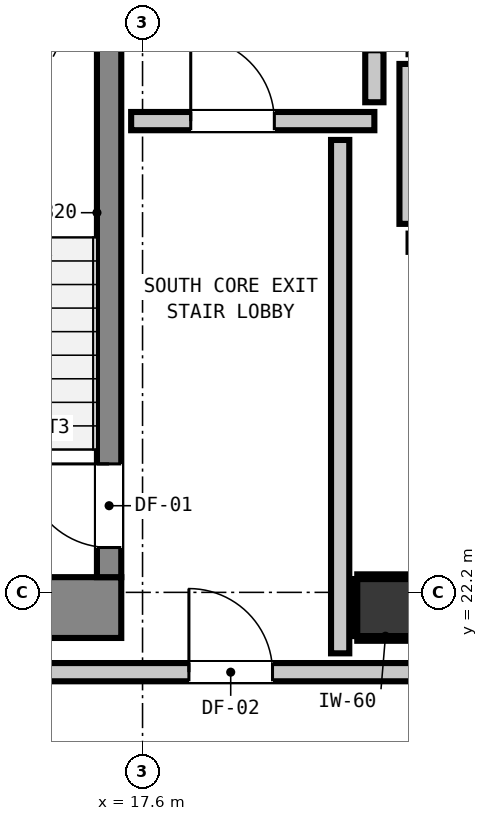
"""IFC4 building model, lengths in metres.
Left out: names, types, materials, properties, quantities, classifications, styles, units other than length and angle.
Written with IfcOpenShell. Run it as: python <this file> out.ifc"""

import sys

from ifc_helpers import new_model, si_unit, direction, frame, frame_2d, origin, origin_2d, place, context, subcontext, project, spatial, rectangle, extrude, element, fill, save


model = new_model("IFC4")
c1 = context("Model", 3, precision=1e-05, world=origin(), true_north=direction((0.0, 1.0)))
c2 = subcontext(c1, "Body", "Model", "MODEL_VIEW")
j1 = project(units=[si_unit("LENGTHUNIT", "METRE"), si_unit("PLANEANGLEUNIT", "RADIAN")], contexts=[c1])
p1 = place(None, origin())
s1 = spatial("IfcSite", under=j1, at=p1, CompositionType="ELEMENT")
p2 = place(p1, origin())
s2 = spatial("IfcBuilding", under=s1, at=p2, CompositionType="ELEMENT")
p3 = place(p2, frame((0.0, 0.0, 203.44)))
s3 = spatial("IfcBuildingStorey", under=s2, at=p3, CompositionType="ELEMENT", Elevation=203.44)
p4 = place(p3, frame((20.8, 22.0, 0.0), z_axis=(0.0, 0.0, 1.0), x_axis=(1.0, 0.0, 0.0)))
e1 = element("IfcColumn", 1, at=p4, inside=s3, PredefinedType="COLUMN", context=c2, shape_type="SweptSolid", body=[
    extrude(rectangle(XDim=0.75, YDim=0.75, at=origin_2d()), origin(), (0.0, 0.0, 1.0), 3.32),
])
p5 = place(p3, frame((13.24, 22.0, 0.0), z_axis=(0.0, 0.0, 1.0), x_axis=(1.0, 0.0, 0.0)))
e2 = element("IfcWall", 2, at=p5, inside=s3, PredefinedType="SHEAR", context=c2, shape_type="SweptSolid", body=[
    extrude(rectangle(XDim=4.08, YDim=0.8, at=frame_2d((2.04, 0.0))), origin(), (0.0, 0.0, 1.0), 3.32),
])
p6 = place(p3, frame((17.16, 22.4, 0.0), z_axis=(0.0, 0.0, 1.0), x_axis=(0.0, 1.0, 0.0)))
e3 = element("IfcWall", 3, at=p6, inside=s3, PredefinedType="SHEAR", context=c2, shape_type="SweptSolid", body=[
    extrude(rectangle(XDim=8.0, YDim=0.32, at=frame_2d((4.0, 0.0))), origin(), (0.0, 0.0, 1.0), 3.32),
])
p7 = place(p6, frame((0.39, 0.0, 0.0)))
e4 = element("IfcOpeningElement", 4, at=p7, cuts=e3, PredefinedType="OPENING", context=c2, shape_type="SweptSolid", body=[
    extrude(rectangle(XDim=1.1, YDim=2.15, at=frame_2d((0.55, 1.075))), frame((0.0, 0.17, 0.0), z_axis=(0.0, -1.0, 0.0), x_axis=(1.0, 0.0, 0.0)), (0.0, 0.0, 1.0), 0.34),
])
for number, where, z_axis, x_axis in (
    (5, (21.1, 26.8, 0.0), (0.0, 0.0, 1.0), (1.0, 0.0, 0.0)),
    (6, (21.1, 29.4, 0.0), (0.0, 0.0, 1.0), (1.0, 0.0, 0.0)),
):
    element("IfcWall", number, at=place(p3, frame(where, z_axis=z_axis, x_axis=x_axis)), inside=s3, PredefinedType="PARTITIONING", context=c2, shape_type="SweptSolid", body=[
        extrude(rectangle(XDim=2.2, YDim=0.24, at=frame_2d((1.1, 0.0))), origin(), (0.0, 0.0, 1.0), 3.1),
    ])
p8 = place(p3, frame((21.1, 27.048, 0.0), z_axis=(0.0, 0.0, 1.0), x_axis=(0.0, 1.0, 0.0)))
e7 = element("IfcWall", 7, at=p8, inside=s3, PredefinedType="PARTITIONING", context=c2, shape_type="SweptSolid", body=[
    extrude(rectangle(XDim=2.104, YDim=0.24, at=frame_2d((1.052, 0.0))), origin(), (0.0, 0.0, 1.0), 2.335),
])
p9 = place(p3, frame((4.587, 21.15, 0.0), z_axis=(0.0, 0.0, 1.0), x_axis=(1.0, 0.0, 0.0)))
e8 = element("IfcWall", 8, at=p9, inside=s3, PredefinedType="PARTITIONING", context=c2, shape_type="SweptSolid", body=[
    extrude(rectangle(XDim=36.626, YDim=0.24, at=frame_2d((18.313, 0.0))), origin(), (0.0, 0.0, 1.0), 3.1),
])
p10 = place(p9, frame((13.623, 0.0, 0.0)))
e9 = element("IfcOpeningElement", 9, at=p10, cuts=e8, PredefinedType="OPENING", context=c2, shape_type="SweptSolid", body=[
    extrude(rectangle(XDim=1.1, YDim=2.15, at=frame_2d((0.55, 1.075))), frame((0.0, 0.13, 0.0), z_axis=(0.0, -1.0, 0.0), x_axis=(1.0, 0.0, 0.0)), (0.0, 0.0, 1.0), 0.26),
])
p11 = place(p9, frame((3.362, 0.0, 0.0)))
e10 = element("IfcOpeningElement", 10, at=p11, cuts=e8, PredefinedType="OPENING", context=c2, shape_type="SweptSolid", body=[
    extrude(rectangle(XDim=0.9, YDim=2.1, at=frame_2d((0.45, 1.05))), frame((0.0, 0.13, 0.0), z_axis=(0.0, -1.0, 0.0), x_axis=(1.0, 0.0, 0.0)), (0.0, 0.0, 1.0), 0.26),
])
p12 = place(p3, frame((17.45, 28.4, 0.0), z_axis=(0.0, 0.0, 1.0), x_axis=(1.0, 0.0, 0.0)))
e11 = element("IfcWall", 11, at=p12, inside=s3, PredefinedType="PARTITIONING", context=c2, shape_type="SweptSolid", body=[
    extrude(rectangle(XDim=3.2, YDim=0.24, at=frame_2d((1.6, 0.0))), origin(), (0.0, 0.0, 1.0), 3.1),
])
p13 = place(p12, frame((0.784, 0.0, 0.0)))
e12 = element("IfcOpeningElement", 12, at=p13, cuts=e11, PredefinedType="OPENING", context=c2, shape_type="SweptSolid", body=[
    extrude(rectangle(XDim=1.1, YDim=2.15, at=frame_2d((0.55, 1.075))), frame((0.0, 0.13, 0.0), z_axis=(0.0, -1.0, 0.0), x_axis=(1.0, 0.0, 0.0)), (0.0, 0.0, 1.0), 0.26),
])
p14 = place(p3, frame((20.2, 21.398, 0.0), z_axis=(0.0, 0.0, 1.0), x_axis=(0.0, 1.0, 0.0)))
e13 = element("IfcWall", 13, at=p14, inside=s3, PredefinedType="PARTITIONING", context=c2, shape_type="SweptSolid", body=[
    extrude(rectangle(XDim=6.754, YDim=0.24, at=frame_2d((3.377, 0.0))), origin(), (0.0, 0.0, 1.0), 3.1),
])
p15 = place(p3, frame((20.65, 28.648, 0.0), z_axis=(0.0, 0.0, 1.0), x_axis=(0.0, 1.0, 0.0)))
e14 = element("IfcWall", 14, at=p15, inside=s3, PredefinedType="PARTITIONING", context=c2, shape_type="SweptSolid", body=[
    extrude(rectangle(XDim=0.684, YDim=0.24, at=frame_2d((0.342, 0.0))), origin(), (0.0, 0.0, 1.0), 2.335),
])
for number, where, z_axis, x_axis in (
    (15, (20.425, 21.593, 0.0), (0.0, 0.0, 1.0), (1.0, 0.0, 0.0)),
    (16, (20.425, 22.407, 0.0), (0.0, 0.0, 1.0), (1.0, 0.0, 0.0)),
):
    element("IfcWall", number, at=place(p3, frame(where, z_axis=z_axis, x_axis=x_axis)), inside=s3, PredefinedType="PARTITIONING", context=c2, shape_type="SweptSolid", body=[
        extrude(rectangle(XDim=0.742, YDim=0.06, at=frame_2d((0.371, 0.0))), origin(), (0.0, 0.0, 1.0), 1.45),
    ])
p16 = place(p3, frame((20.393, 21.625, 0.0), z_axis=(0.0, 0.0, 1.0), x_axis=(0.0, 1.0, 0.0)))
e17 = element("IfcWall", 17, at=p16, inside=s3, PredefinedType="PARTITIONING", context=c2, shape_type="SweptSolid", body=[
    extrude(rectangle(XDim=0.75, YDim=0.06, at=frame_2d((0.375, 0.0))), origin(), (0.0, 0.0, 1.0), 1.45),
])
p17 = place(p7, origin())
e18 = element("IfcDoor", 18, at=p17, inside=s3, OperationType="SINGLE_SWING_RIGHT", PredefinedType="DOOR", context=c2, shape_type="SweptSolid", body=[
    extrude(rectangle(XDim=1.1, YDim=2.15, at=frame_2d((0.55, 1.075))), frame((0.0, 0.025, 0.0), z_axis=(0.0, -1.0, 0.0), x_axis=(1.0, 0.0, 0.0)), (0.0, 0.0, 1.0), 0.05),
])
fill(e4, e18)
p18 = place(p13, origin())
e19 = element("IfcDoor", 19, at=p18, inside=s3, OperationType="SINGLE_SWING_LEFT", PredefinedType="DOOR", context=c2, shape_type="SweptSolid", body=[
    extrude(rectangle(XDim=1.1, YDim=2.15, at=frame_2d((0.55, 1.075))), frame((0.0, 0.025, 0.0), z_axis=(0.0, -1.0, 0.0), x_axis=(1.0, 0.0, 0.0)), (0.0, 0.0, 1.0), 0.05),
])
fill(e12, e19)
p19 = place(p10, origin())
e20 = element("IfcDoor", 20, at=p19, inside=s3, OperationType="SINGLE_SWING_LEFT", PredefinedType="DOOR", context=c2, shape_type="SweptSolid", body=[
    extrude(rectangle(XDim=1.1, YDim=2.15, at=frame_2d((0.55, 1.075))), frame((0.0, 0.025, 0.0), z_axis=(0.0, -1.0, 0.0), x_axis=(1.0, 0.0, 0.0)), (0.0, 0.0, 1.0), 0.05),
])
fill(e9, e20)
save(model, sys.argv[1])
